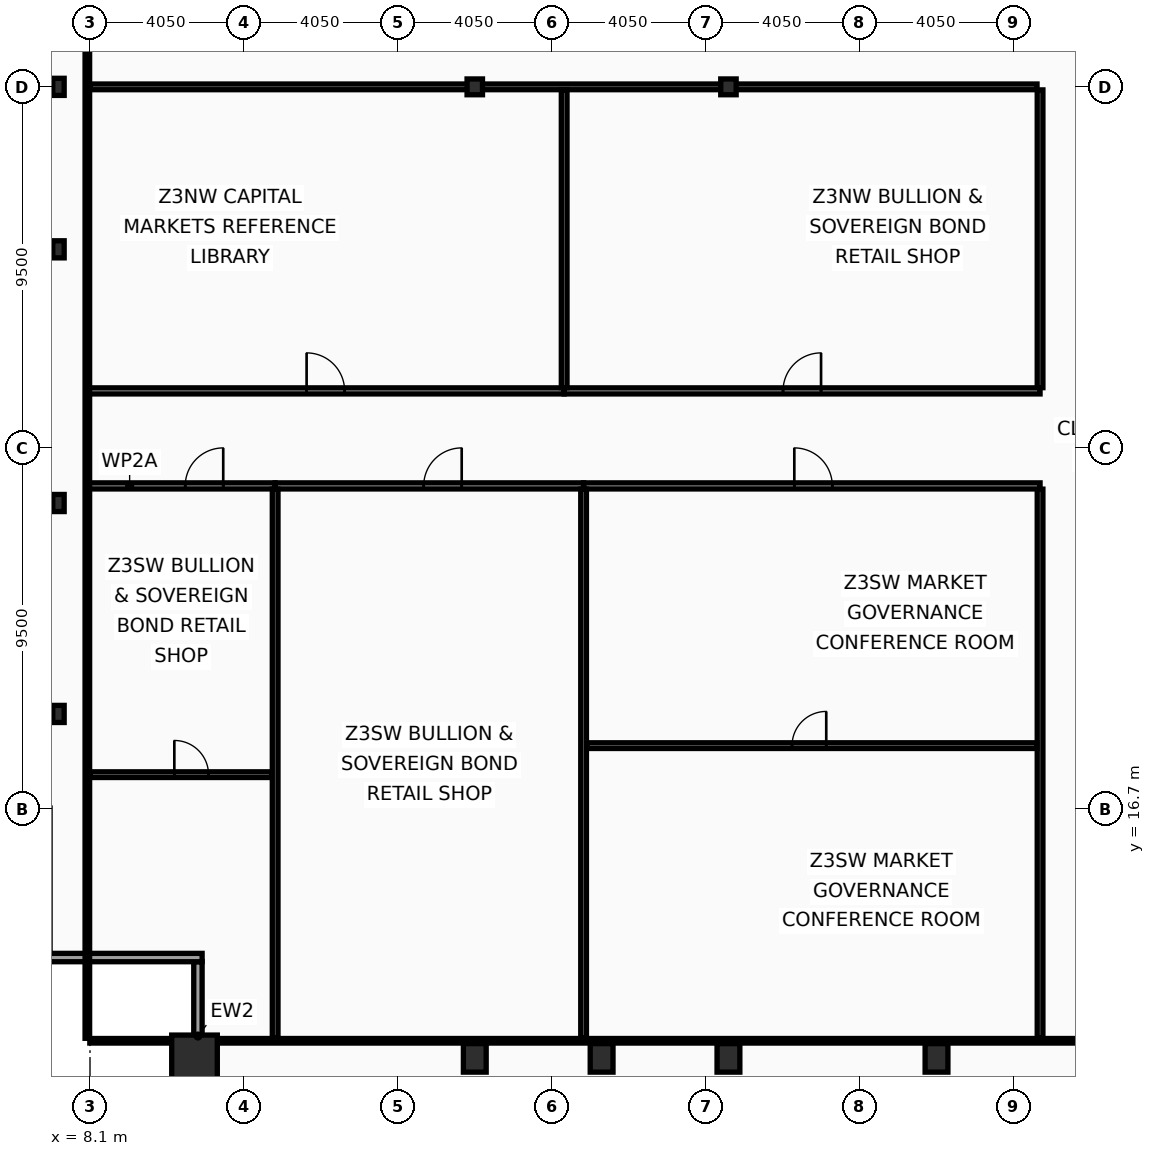
"""IFC4 building model, lengths in metres.
Left out: names, types, materials, properties, quantities, classifications, styles, units other than length and angle.
Written with IfcOpenShell. Run it as: python <this file> out.ifc"""

import sys

from ifc_helpers import new_model, si_unit, direction, frame, frame_2d, origin, origin_2d, place, context, subcontext, project, spatial, rectangle, hollow_rectangle, i_section, extrude, element, fill, save


model = new_model("IFC4")
c1 = context("Model", 3, precision=1e-05, world=origin(), true_north=direction((0.0, 1.0)))
c2 = subcontext(c1, "Body", "Model", "MODEL_VIEW")
j1 = project(units=[si_unit("LENGTHUNIT", "METRE"), si_unit("PLANEANGLEUNIT", "RADIAN")], contexts=[c1])
p1 = place(None, origin())
s1 = spatial("IfcSite", under=j1, at=p1, CompositionType="ELEMENT")
p2 = place(p1, origin())
s2 = spatial("IfcBuilding", under=s1, at=p2, CompositionType="ELEMENT")
p3 = place(p2, frame((0.0, 0.0, 192.2)))
s3 = spatial("IfcBuildingStorey", under=s2, at=p3, CompositionType="ELEMENT", Elevation=192.2)
p4 = place(p3, frame((10.85, 10.15, 0.0), z_axis=(0.0, 0.0, 1.0), x_axis=(1.0, 0.0, 0.0)))
e1 = element("IfcColumn", 1, at=p4, inside=s3, PredefinedType="COLUMN", context=c2, shape_type="SweptSolid", body=[
    extrude(hollow_rectangle(XDim=1.2, YDim=1.2, WallThickness=0.06, at=origin_2d()), origin(), (0.0, 0.0, 1.0), 3.6),
])
for number, where, z_axis, x_axis in (
    (2, (18.225, 10.15, 0.0), (0.0, 0.0, 1.0), (1.0, 0.0, 0.0)),
    (3, (21.562, 10.15, 0.0), (0.0, 0.0, 1.0), (1.0, 0.0, 0.0)),
    (4, (24.9, 10.15, 0.0), (0.0, 0.0, 1.0), (1.0, 0.0, 0.0)),
    (5, (30.375, 10.15, 0.0), (0.0, 0.0, 1.0), (1.0, 0.0, 0.0)),
):
    element("IfcColumn", number, at=place(p3, frame(where, z_axis=z_axis, x_axis=x_axis)), inside=s3, PredefinedType="COLUMN", context=c2, shape_type="SweptSolid", body=[
        extrude(hollow_rectangle(XDim=0.6, YDim=0.75, WallThickness=0.045, at=origin_2d()), origin(), (0.0, 0.0, 1.0), 3.6),
    ])
for number, where, z_axis, x_axis in (
    (6, (7.27, 19.2, 0.0), (0.0, 0.0, 1.0), (1.0, 0.0, 0.0)),
    (7, (7.27, 24.75, 0.0), (0.0, 0.0, 1.0), (1.0, 0.0, 0.0)),
    (8, (7.27, 31.425, 0.0), (0.0, 0.0, 1.0), (1.0, 0.0, 0.0)),
    (9, (7.27, 35.7, 0.0), (0.0, 0.0, 1.0), (1.0, 0.0, 0.0)),
):
    element("IfcColumn", number, at=place(p3, frame(where, z_axis=z_axis, x_axis=x_axis)), inside=s3, PredefinedType="COLUMN", context=c2, shape_type="SweptSolid", body=[
        extrude(i_section(OverallWidth=0.3, OverallDepth=0.45, WebThickness=0.014, FlangeThickness=0.026, at=origin_2d()), origin(), (0.0, 0.0, 1.0), 3.6),
    ])
for number, where, z_axis, x_axis in (
    (10, (18.225, 35.7, 0.0), (0.0, 0.0, 1.0), (1.0, 0.0, 0.0)),
    (11, (24.9, 35.7, 0.0), (0.0, 0.0, 1.0), (1.0, 0.0, 0.0)),
):
    element("IfcColumn", number, at=place(p3, frame(where, z_axis=z_axis, x_axis=x_axis)), inside=s3, PredefinedType="COLUMN", context=c2, shape_type="SweptSolid", body=[
        extrude(i_section(OverallWidth=0.406, OverallDepth=0.416, WebThickness=0.03, FlangeThickness=0.048, at=origin_2d()), origin(), (0.0, 0.0, 1.0), 3.6),
    ])
p5 = place(p3, frame((10.94, 8.77, 0.0), z_axis=(0.0, 0.0, 1.0), x_axis=(0.0, 1.0, 0.0)))
e12 = element("IfcWall", 12, at=p5, inside=s3, PredefinedType="SOLIDWALL", context=c2, shape_type="SweptSolid", body=[
    extrude(rectangle(XDim=3.91, YDim=0.22, at=frame_2d((1.955, 0.0))), origin(), (0.0, 0.0, 1.0), 2.83),
])
p6 = place(p3, frame((11.05, 12.79, 0.0), z_axis=(0.0, 0.0, 1.0), x_axis=(-1.0, 0.0, 0.0)))
e13 = element("IfcWall", 13, at=p6, inside=s3, PredefinedType="SOLIDWALL", context=c2, shape_type="SweptSolid", body=[
    extrude(rectangle(XDim=4.22, YDim=0.22, at=frame_2d((2.11, 0.0))), origin(), (0.0, 0.0, 1.0), 2.83),
])
p7 = place(p3, frame((33.1, 10.665, 0.0), z_axis=(0.0, 0.0, 1.0), x_axis=(0.0, 1.0, 0.0)))
e14 = element("IfcWall", 14, at=p7, inside=s3, PredefinedType="PARTITIONING", context=c2, shape_type="SweptSolid", body=[
    extrude(rectangle(XDim=14.45, YDim=0.15, at=frame_2d((7.225, 0.0))), origin(), (0.0, 0.0, 1.0), 2.98),
])
p8 = place(p3, frame((33.1, 27.785, 0.0), z_axis=(0.0, 0.0, 1.0), x_axis=(0.0, 1.0, 0.0)))
e15 = element("IfcWall", 15, at=p8, inside=s3, PredefinedType="PARTITIONING", context=c2, shape_type="SweptSolid", body=[
    extrude(rectangle(XDim=7.835, YDim=0.15, at=frame_2d((3.917, 0.0))), origin(), (0.0, 0.0, 1.0), 2.98),
])
p9 = place(p3, frame((8.095, 35.7, 0.0), z_axis=(0.0, 0.0, 1.0), x_axis=(1.0, 0.0, 0.0)))
e16 = element("IfcWall", 16, at=p9, inside=s3, PredefinedType="PARTITIONING", context=c2, shape_type="SweptSolid", body=[
    extrude(rectangle(XDim=24.925, YDim=0.15, at=frame_2d((12.462, 0.0))), origin(), (0.0, 0.0, 1.0), 2.73),
])
p10 = place(p3, frame((8.03, 25.2, 0.0), z_axis=(0.0, 0.0, 1.0), x_axis=(1.0, 0.0, 0.0)))
e17 = element("IfcWall", 17, at=p10, inside=s3, PredefinedType="PARTITIONING", context=c2, shape_type="SweptSolid", body=[
    extrude(rectangle(XDim=4.942, YDim=0.16, at=frame_2d((2.471, 0.0))), origin(), (0.0, 0.0, 1.0), 3.44),
])
p11 = place(p10, frame((2.576, 0.0, 0.0)))
e18 = element("IfcOpeningElement", 18, at=p11, cuts=e17, PredefinedType="OPENING", context=c2, shape_type="SweptSolid", body=[
    extrude(rectangle(XDim=1.0, YDim=2.05, at=frame_2d((0.5, 1.025))), frame((0.0, 0.09, 0.0), z_axis=(0.0, -1.0, 0.0), x_axis=(1.0, 0.0, 0.0)), (0.0, 0.0, 1.0), 0.18),
])
p12 = place(p3, frame((8.095, 17.602, 0.0), z_axis=(0.0, 0.0, 1.0), x_axis=(1.0, 0.0, 0.0)))
e19 = element("IfcWall", 19, at=p12, inside=s3, PredefinedType="PARTITIONING", context=c2, shape_type="SweptSolid", body=[
    extrude(rectangle(XDim=4.797, YDim=0.15, at=frame_2d((2.398, 0.0))), origin(), (0.0, 0.0, 1.0), 2.83),
])
p13 = place(p12, frame((2.224, 0.0, 0.0)))
e20 = element("IfcOpeningElement", 20, at=p13, cuts=e19, PredefinedType="OPENING", context=c2, shape_type="SweptSolid", body=[
    extrude(rectangle(XDim=0.9, YDim=2.05, at=frame_2d((0.45, 1.025))), frame((0.0, 0.085, 0.0), z_axis=(0.0, -1.0, 0.0), x_axis=(1.0, 0.0, 0.0)), (0.0, 0.0, 1.0), 0.17),
])
p14 = place(p3, frame((12.972, 25.2, 0.0), z_axis=(0.0, 0.0, 1.0), x_axis=(1.0, 0.0, 0.0)))
e21 = element("IfcWall", 21, at=p14, inside=s3, PredefinedType="PARTITIONING", context=c2, shape_type="SweptSolid", body=[
    extrude(rectangle(XDim=8.116, YDim=0.16, at=frame_2d((4.058, 0.0))), origin(), (0.0, 0.0, 1.0), 2.73),
])
p15 = place(p14, frame((3.909, 0.0, 0.0)))
e22 = element("IfcOpeningElement", 22, at=p15, cuts=e21, PredefinedType="OPENING", context=c2, shape_type="SweptSolid", body=[
    extrude(rectangle(XDim=1.0, YDim=2.05, at=frame_2d((0.5, 1.025))), frame((0.0, 0.09, 0.0), z_axis=(0.0, -1.0, 0.0), x_axis=(1.0, 0.0, 0.0)), (0.0, 0.0, 1.0), 0.18),
])
p16 = place(p3, frame((12.972, 10.665, 0.0), z_axis=(0.0, 0.0, 1.0), x_axis=(0.0, 1.0, 0.0)))
e23 = element("IfcWall", 23, at=p16, inside=s3, PredefinedType="PARTITIONING", context=c2, shape_type="SweptSolid", body=[
    extrude(rectangle(XDim=14.45, YDim=0.15, at=frame_2d((7.225, 0.0))), origin(), (0.0, 0.0, 1.0), 2.73),
])
p17 = place(p3, frame((21.088, 25.2, 0.0), z_axis=(0.0, 0.0, 1.0), x_axis=(1.0, 0.0, 0.0)))
e24 = element("IfcWall", 24, at=p17, inside=s3, PredefinedType="PARTITIONING", context=c2, shape_type="SweptSolid", body=[
    extrude(rectangle(XDim=12.012, YDim=0.16, at=frame_2d((6.006, 0.0))), origin(), (0.0, 0.0, 1.0), 2.73),
])
p18 = place(p17, frame((5.545, 0.0, 0.0)))
e25 = element("IfcOpeningElement", 25, at=p18, cuts=e24, PredefinedType="OPENING", context=c2, shape_type="SweptSolid", body=[
    extrude(rectangle(XDim=1.0, YDim=2.05, at=frame_2d((0.5, 1.025))), frame((0.0, 0.09, 0.0), z_axis=(0.0, -1.0, 0.0), x_axis=(1.0, 0.0, 0.0)), (0.0, 0.0, 1.0), 0.18),
])
p19 = place(p3, frame((21.088, 10.665, 0.0), z_axis=(0.0, 0.0, 1.0), x_axis=(0.0, 1.0, 0.0)))
e26 = element("IfcWall", 26, at=p19, inside=s3, PredefinedType="PARTITIONING", context=c2, shape_type="SweptSolid", body=[
    extrude(rectangle(XDim=14.45, YDim=0.15, at=frame_2d((7.225, 0.0))), origin(), (0.0, 0.0, 1.0), 2.98),
])
p20 = place(p3, frame((21.168, 18.366, 0.0), z_axis=(0.0, 0.0, 1.0), x_axis=(1.0, 0.0, 0.0)))
e27 = element("IfcWall", 27, at=p20, inside=s3, PredefinedType="PARTITIONING", context=c2, shape_type="SweptSolid", body=[
    extrude(rectangle(XDim=11.852, YDim=0.15, at=frame_2d((5.926, 0.0))), origin(), (0.0, 0.0, 1.0), 2.73),
])
p21 = place(p20, frame((5.405, 0.0, 0.0)))
e28 = element("IfcOpeningElement", 28, at=p21, cuts=e27, PredefinedType="OPENING", context=c2, shape_type="SweptSolid", body=[
    extrude(rectangle(XDim=0.9, YDim=2.05, at=frame_2d((0.45, 1.025))), frame((0.0, 0.085, 0.0), z_axis=(0.0, -1.0, 0.0), x_axis=(1.0, 0.0, 0.0)), (0.0, 0.0, 1.0), 0.17),
])
p22 = place(p3, frame((8.03, 27.7, 0.0), z_axis=(0.0, 0.0, 1.0), x_axis=(1.0, 0.0, 0.0)))
e29 = element("IfcWall", 29, at=p22, inside=s3, PredefinedType="PARTITIONING", context=c2, shape_type="SweptSolid", body=[
    extrude(rectangle(XDim=12.547, YDim=0.16, at=frame_2d((6.273, 0.0))), origin(), (0.0, 0.0, 1.0), 2.73),
])
p23 = place(p22, frame((5.77, 0.0, 0.0)))
e30 = element("IfcOpeningElement", 30, at=p23, cuts=e29, PredefinedType="OPENING", context=c2, shape_type="SweptSolid", body=[
    extrude(rectangle(XDim=1.0, YDim=2.05, at=frame_2d((0.5, 1.025))), frame((0.0, 0.09, 0.0), z_axis=(0.0, -1.0, 0.0), x_axis=(1.0, 0.0, 0.0)), (0.0, 0.0, 1.0), 0.18),
])
p24 = place(p3, frame((20.577, 27.7, 0.0), z_axis=(0.0, 0.0, 1.0), x_axis=(1.0, 0.0, 0.0)))
e31 = element("IfcWall", 31, at=p24, inside=s3, PredefinedType="PARTITIONING", context=c2, shape_type="SweptSolid", body=[
    extrude(rectangle(XDim=12.523, YDim=0.16, at=frame_2d((6.261, 0.0))), origin(), (0.0, 0.0, 1.0), 2.73),
])
p25 = place(p24, frame((5.76, 0.0, 0.0)))
e32 = element("IfcOpeningElement", 32, at=p25, cuts=e31, PredefinedType="OPENING", context=c2, shape_type="SweptSolid", body=[
    extrude(rectangle(XDim=1.0, YDim=2.05, at=frame_2d((0.5, 1.025))), frame((0.0, 0.09, 0.0), z_axis=(0.0, -1.0, 0.0), x_axis=(1.0, 0.0, 0.0)), (0.0, 0.0, 1.0), 0.18),
])
p26 = place(p3, frame((20.577, 27.785, 0.0), z_axis=(0.0, 0.0, 1.0), x_axis=(0.0, 1.0, 0.0)))
e33 = element("IfcWall", 33, at=p26, inside=s3, PredefinedType="PARTITIONING", context=c2, shape_type="SweptSolid", body=[
    extrude(rectangle(XDim=7.835, YDim=0.15, at=frame_2d((3.917, 0.0))), origin(), (0.0, 0.0, 1.0), 2.98),
])
p27 = place(p3, frame((8.03, 10.665, 0.0), z_axis=(0.0, 0.0, 1.0), x_axis=(0.0, 1.0, 0.0)))
e34 = element("IfcWall", 34, at=p27, inside=s3, PredefinedType="PARTITIONING", context=c2, shape_type="SweptSolid", body=[
    extrude(rectangle(XDim=42.11, YDim=0.12, at=frame_2d((21.055, 0.0))), origin(), (0.0, 0.0, 1.0), 2.73),
])
p28 = place(p3, frame((8.095, 10.6, 0.0), z_axis=(0.0, 0.0, 1.0), x_axis=(1.0, 0.0, 0.0)))
e35 = element("IfcWall", 35, at=p28, inside=s3, PredefinedType="PARTITIONING", context=c2, shape_type="SweptSolid", body=[
    extrude(rectangle(XDim=56.71, YDim=0.12, at=frame_2d((28.355, 0.0))), origin(), (0.0, 0.0, 1.0), 2.73),
])
p29 = place(p11, origin())
e36 = element("IfcDoor", 36, at=p29, inside=s3, OperationType="SINGLE_SWING_RIGHT", PredefinedType="DOOR", context=c2, shape_type="SweptSolid", body=[
    extrude(rectangle(XDim=1.0, YDim=2.05, at=frame_2d((0.5, 1.025))), frame((0.0, 0.025, 0.0), z_axis=(0.0, -1.0, 0.0), x_axis=(1.0, 0.0, 0.0)), (0.0, 0.0, 1.0), 0.05),
])
fill(e18, e36)
p30 = place(p13, origin())
e37 = element("IfcDoor", 37, at=p30, inside=s3, OperationType="SINGLE_SWING_LEFT", PredefinedType="DOOR", context=c2, shape_type="SweptSolid", body=[
    extrude(rectangle(XDim=0.9, YDim=2.05, at=frame_2d((0.45, 1.025))), frame((0.0, 0.025, 0.0), z_axis=(0.0, -1.0, 0.0), x_axis=(1.0, 0.0, 0.0)), (0.0, 0.0, 1.0), 0.05),
])
fill(e20, e37)
p31 = place(p15, origin())
e38 = element("IfcDoor", 38, at=p31, inside=s3, OperationType="SINGLE_SWING_RIGHT", PredefinedType="DOOR", context=c2, shape_type="SweptSolid", body=[
    extrude(rectangle(XDim=1.0, YDim=2.05, at=frame_2d((0.5, 1.025))), frame((0.0, 0.025, 0.0), z_axis=(0.0, -1.0, 0.0), x_axis=(1.0, 0.0, 0.0)), (0.0, 0.0, 1.0), 0.05),
])
fill(e22, e38)
p32 = place(p18, origin())
e39 = element("IfcDoor", 39, at=p32, inside=s3, OperationType="SINGLE_SWING_LEFT", PredefinedType="DOOR", context=c2, shape_type="SweptSolid", body=[
    extrude(rectangle(XDim=1.0, YDim=2.05, at=frame_2d((0.5, 1.025))), frame((0.0, 0.025, 0.0), z_axis=(0.0, -1.0, 0.0), x_axis=(1.0, 0.0, 0.0)), (0.0, 0.0, 1.0), 0.05),
])
fill(e25, e39)
p33 = place(p21, origin())
e40 = element("IfcDoor", 40, at=p33, inside=s3, OperationType="SINGLE_SWING_RIGHT", PredefinedType="DOOR", context=c2, shape_type="SweptSolid", body=[
    extrude(rectangle(XDim=0.9, YDim=2.05, at=frame_2d((0.45, 1.025))), frame((0.0, 0.025, 0.0), z_axis=(0.0, -1.0, 0.0), x_axis=(1.0, 0.0, 0.0)), (0.0, 0.0, 1.0), 0.05),
])
fill(e28, e40)
p34 = place(p23, origin())
e41 = element("IfcDoor", 41, at=p34, inside=s3, OperationType="SINGLE_SWING_LEFT", PredefinedType="DOOR", context=c2, shape_type="SweptSolid", body=[
    extrude(rectangle(XDim=1.0, YDim=2.05, at=frame_2d((0.5, 1.025))), frame((0.0, 0.025, 0.0), z_axis=(0.0, -1.0, 0.0), x_axis=(1.0, 0.0, 0.0)), (0.0, 0.0, 1.0), 0.05),
])
fill(e30, e41)
p35 = place(p25, origin())
e42 = element("IfcDoor", 42, at=p35, inside=s3, OperationType="SINGLE_SWING_RIGHT", PredefinedType="DOOR", context=c2, shape_type="SweptSolid", body=[
    extrude(rectangle(XDim=1.0, YDim=2.05, at=frame_2d((0.5, 1.025))), frame((0.0, 0.025, 0.0), z_axis=(0.0, -1.0, 0.0), x_axis=(1.0, 0.0, 0.0)), (0.0, 0.0, 1.0), 0.05),
])
fill(e32, e42)
save(model, sys.argv[1])
